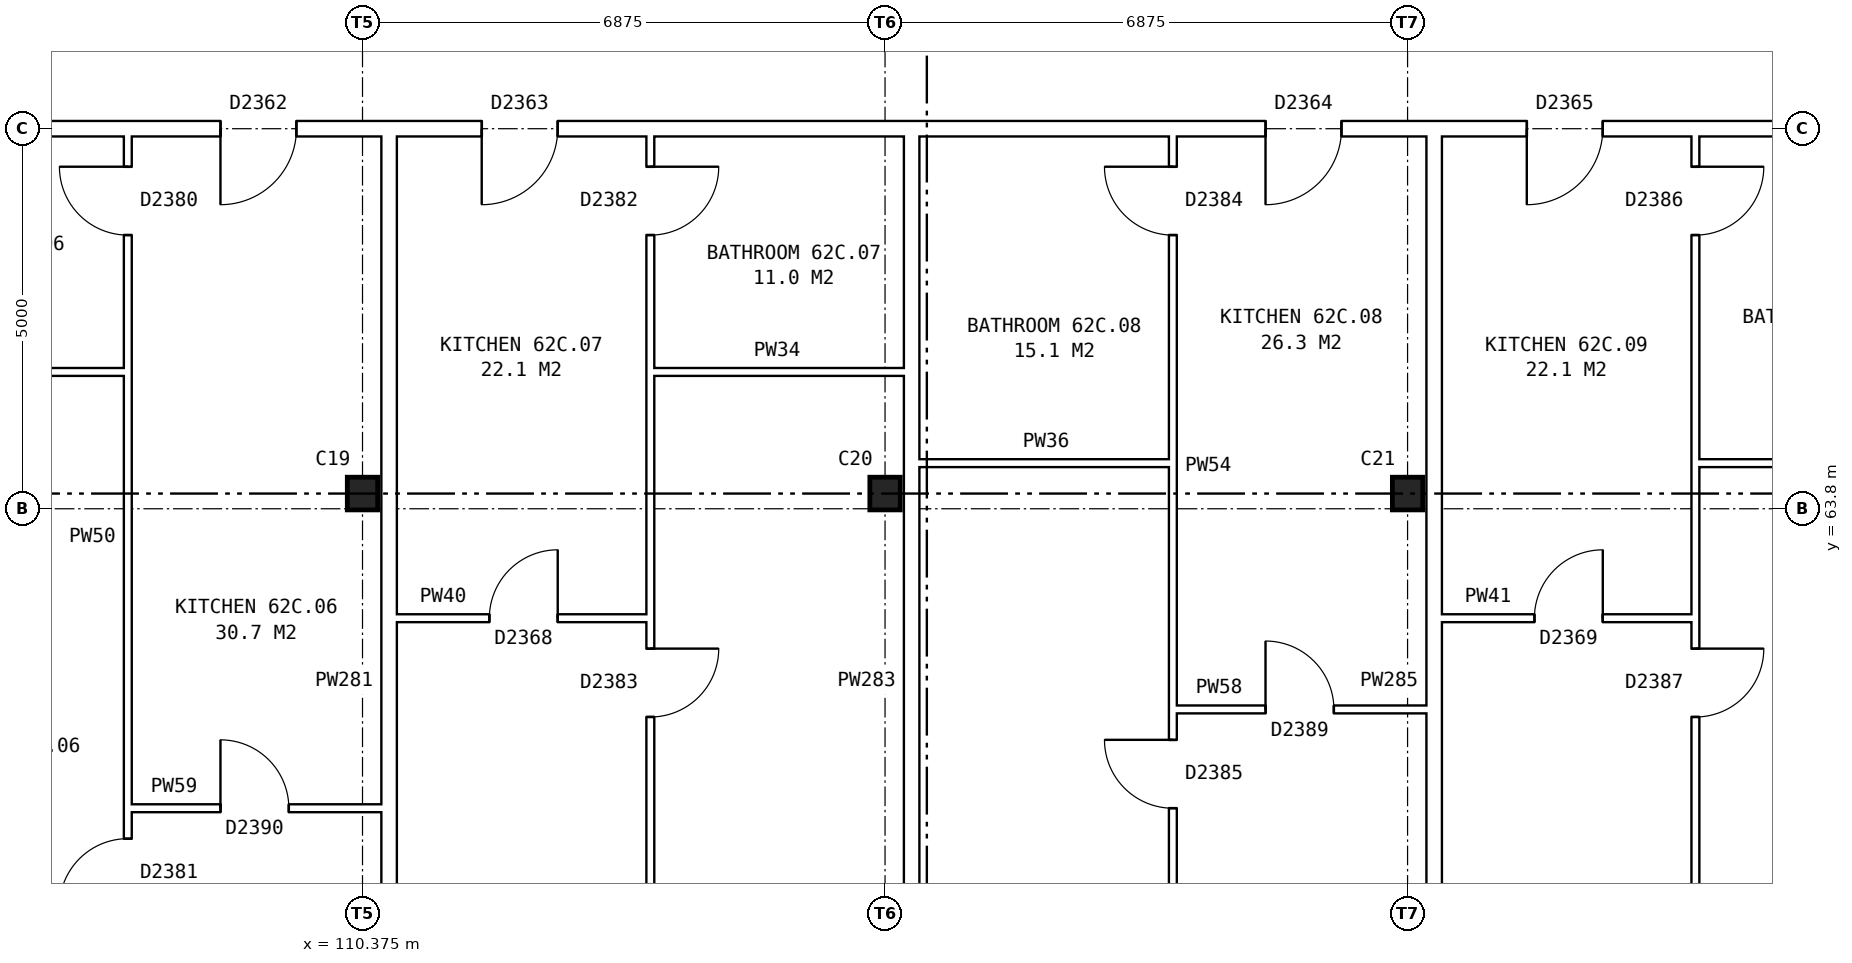
"""IFC4 building model, lengths in metres.
Left out: names, types, materials, properties, quantities, classifications, styles, units other than length and angle.
Written with IfcOpenShell. Run it as: python <this file> out.ifc"""

import sys

from ifc_helpers import new_model, si_unit, direction, frame, frame_2d, origin, origin_2d, place, context, subcontext, project, spatial, rectangle, i_section, extrude, element, fill, save


model = new_model("IFC4")
c1 = context("Model", 3, precision=1e-05, world=origin(), true_north=direction((0.0, 1.0)))
c2 = subcontext(c1, "Body", "Model", "MODEL_VIEW")
j1 = project(units=[si_unit("LENGTHUNIT", "METRE"), si_unit("PLANEANGLEUNIT", "RADIAN")], contexts=[c1])
p1 = place(None, origin())
s1 = spatial("IfcSite", under=j1, at=p1, CompositionType="ELEMENT")
p2 = place(p1, origin())
s2 = spatial("IfcBuilding", under=s1, at=p2, CompositionType="ELEMENT")
p3 = place(p2, frame((0.0, 0.0, 221.4)))
s3 = spatial("IfcBuildingStorey", under=s2, at=p3, CompositionType="ELEMENT", Elevation=221.4)
for number, where, z_axis, x_axis in (
    (1, (110.375, 64.0, 0.0), (0.0, 0.0, 1.0), (1.0, 0.0, 0.0)),
    (2, (117.25, 64.0, 0.0), (0.0, 0.0, 1.0), (1.0, 0.0, 0.0)),
    (3, (124.125, 64.0, 0.0), (0.0, 0.0, 1.0), (1.0, 0.0, 0.0)),
):
    element("IfcColumn", number, at=place(p3, frame(where, z_axis=z_axis, x_axis=x_axis)), inside=s3, PredefinedType="COLUMN", context=c2, shape_type="SweptSolid", body=[
        extrude(i_section(OverallWidth=0.4, OverallDepth=0.43, WebThickness=0.04, FlangeThickness=0.04, at=origin_2d()), origin(), (0.0, 0.0, 1.0), 2.85),
    ])
p4 = place(p3, frame((107.287, 59.86, 0.0), z_axis=(0.0, 0.0, 1.0), x_axis=(1.0, 0.0, 0.0)))
e4 = element("IfcWall", 4, at=p4, inside=s3, PredefinedType="PARTITIONING", context=c2, shape_type="SweptSolid", body=[
    extrude(rectangle(XDim=3.338, YDim=0.1, at=frame_2d((1.669, 0.0))), origin(), (0.0, 0.0, 1.0), 2.85),
])
p5 = place(p4, frame((1.219, 0.0, 0.0)))
e5 = element("IfcOpeningElement", 5, at=p5, cuts=e4, PredefinedType="OPENING", context=c2, shape_type="SweptSolid", body=[
    extrude(rectangle(XDim=0.9, YDim=2.1, at=frame_2d((0.45, 1.05))), frame((0.0, 0.06, 0.0), z_axis=(0.0, -1.0, 0.0), x_axis=(1.0, 0.0, 0.0)), (0.0, 0.0, 1.0), 0.12),
])
p6 = place(p3, frame((121.037, 61.16, 0.0), z_axis=(0.0, 0.0, 1.0), x_axis=(1.0, 0.0, 0.0)))
e6 = element("IfcWall", 6, at=p6, inside=s3, PredefinedType="PARTITIONING", context=c2, shape_type="SweptSolid", body=[
    extrude(rectangle(XDim=3.338, YDim=0.1, at=frame_2d((1.669, 0.0))), origin(), (0.0, 0.0, 1.0), 2.85),
])
p7 = place(p6, frame((1.219, 0.0, 0.0)))
e7 = element("IfcOpeningElement", 7, at=p7, cuts=e6, PredefinedType="OPENING", context=c2, shape_type="SweptSolid", body=[
    extrude(rectangle(XDim=0.9, YDim=2.1, at=frame_2d((0.45, 1.05))), frame((0.0, 0.06, 0.0), z_axis=(0.0, -1.0, 0.0), x_axis=(1.0, 0.0, 0.0)), (0.0, 0.0, 1.0), 0.12),
])
p8 = place(p3, frame((110.825, 62.36, 0.0), z_axis=(0.0, 0.0, 1.0), x_axis=(1.0, 0.0, 0.0)))
e8 = element("IfcWall", 8, at=p8, inside=s3, PredefinedType="PARTITIONING", context=c2, shape_type="SweptSolid", body=[
    extrude(rectangle(XDim=3.337, YDim=0.1, at=frame_2d((1.668, 0.0))), origin(), (0.0, 0.0, 1.0), 2.85),
])
p9 = place(p8, frame((1.219, 0.0, 0.0)))
e9 = element("IfcOpeningElement", 9, at=p9, cuts=e8, PredefinedType="OPENING", context=c2, shape_type="SweptSolid", body=[
    extrude(rectangle(XDim=0.9, YDim=2.1, at=frame_2d((0.45, 1.05))), frame((0.0, 0.06, 0.0), z_axis=(0.0, -1.0, 0.0), x_axis=(1.0, 0.0, 0.0)), (0.0, 0.0, 1.0), 0.12),
])
p10 = place(p3, frame((124.575, 62.36, 0.0), z_axis=(0.0, 0.0, 1.0), x_axis=(1.0, 0.0, 0.0)))
e10 = element("IfcWall", 10, at=p10, inside=s3, PredefinedType="PARTITIONING", context=c2, shape_type="SweptSolid", body=[
    extrude(rectangle(XDim=3.337, YDim=0.1, at=frame_2d((1.668, 0.0))), origin(), (0.0, 0.0, 1.0), 2.85),
])
p11 = place(p10, frame((1.219, 0.0, 0.0)))
e11 = element("IfcOpeningElement", 11, at=p11, cuts=e10, PredefinedType="OPENING", context=c2, shape_type="SweptSolid", body=[
    extrude(rectangle(XDim=0.9, YDim=2.1, at=frame_2d((0.45, 1.05))), frame((0.0, 0.06, 0.0), z_axis=(0.0, -1.0, 0.0), x_axis=(1.0, 0.0, 0.0)), (0.0, 0.0, 1.0), 0.12),
])
p12 = place(p3, frame((117.7, 64.4, 0.0), z_axis=(0.0, 0.0, 1.0), x_axis=(1.0, 0.0, 0.0)))
e12 = element("IfcWall", 12, at=p12, inside=s3, PredefinedType="PARTITIONING", context=c2, shape_type="SweptSolid", body=[
    extrude(rectangle(XDim=3.337, YDim=0.1, at=frame_2d((1.668, 0.0))), origin(), (0.0, 0.0, 1.0), 2.85),
])
p13 = place(p3, frame((127.912, 64.4, 0.0), z_axis=(0.0, 0.0, 1.0), x_axis=(1.0, 0.0, 0.0)))
e13 = element("IfcWall", 13, at=p13, inside=s3, PredefinedType="PARTITIONING", context=c2, shape_type="SweptSolid", body=[
    extrude(rectangle(XDim=3.448, YDim=0.1, at=frame_2d((1.724, 0.0))), origin(), (0.0, 0.0, 1.0), 2.85),
])
p14 = place(p3, frame((100.412, 65.6, 0.0), z_axis=(0.0, 0.0, 1.0), x_axis=(1.0, 0.0, 0.0)))
e14 = element("IfcWall", 14, at=p14, inside=s3, PredefinedType="PARTITIONING", context=c2, shape_type="SweptSolid", body=[
    extrude(rectangle(XDim=6.875, YDim=0.1, at=frame_2d((3.438, 0.0))), origin(), (0.0, 0.0, 1.0), 2.85),
])
p15 = place(p3, frame((114.162, 65.6, 0.0), z_axis=(0.0, 0.0, 1.0), x_axis=(1.0, 0.0, 0.0)))
e15 = element("IfcWall", 15, at=p15, inside=s3, PredefinedType="PARTITIONING", context=c2, shape_type="SweptSolid", body=[
    extrude(rectangle(XDim=3.338, YDim=0.1, at=frame_2d((1.669, 0.0))), origin(), (0.0, 0.0, 1.0), 2.85),
])
p16 = place(p3, frame((75.64, 68.8, 0.0), z_axis=(0.0, 0.0, 1.0), x_axis=(1.0, 0.0, 0.0)))
e16 = element("IfcWall", 16, at=p16, inside=s3, PredefinedType="PARTITIONING", context=c2, shape_type="SweptSolid", body=[
    extrude(rectangle(XDim=55.72, YDim=0.2, at=frame_2d((27.86, 0.0))), origin(), (0.0, 0.0, 1.0), 2.85),
])
p17 = place(p16, frame((1.399, 0.0, 0.0)))
e17 = element("IfcOpeningElement", 17, at=p17, cuts=e16, PredefinedType="OPENING", context=c2, shape_type="SweptSolid", body=[
    extrude(rectangle(XDim=1.0, YDim=2.1, at=frame_2d((0.5, 1.05))), frame((0.0, 0.11, 0.0), z_axis=(0.0, -1.0, 0.0), x_axis=(1.0, 0.0, 0.0)), (0.0, 0.0, 1.0), 0.22),
])
p18 = place(p16, frame((12.241, 0.0, 0.0)))
e18 = element("IfcOpeningElement", 18, at=p18, cuts=e16, PredefinedType="OPENING", context=c2, shape_type="SweptSolid", body=[
    extrude(rectangle(XDim=1.0, YDim=2.1, at=frame_2d((0.5, 1.05))), frame((0.0, 0.11, 0.0), z_axis=(0.0, -1.0, 0.0), x_axis=(1.0, 0.0, 0.0)), (0.0, 0.0, 1.0), 0.22),
])
p19 = place(p16, frame((22.553, 0.0, 0.0)))
e19 = element("IfcOpeningElement", 19, at=p19, cuts=e16, PredefinedType="OPENING", context=c2, shape_type="SweptSolid", body=[
    extrude(rectangle(XDim=1.0, YDim=2.1, at=frame_2d((0.5, 1.05))), frame((0.0, 0.11, 0.0), z_axis=(0.0, -1.0, 0.0), x_axis=(1.0, 0.0, 0.0)), (0.0, 0.0, 1.0), 0.22),
])
p20 = place(p16, frame((32.866, 0.0, 0.0)))
e20 = element("IfcOpeningElement", 20, at=p20, cuts=e16, PredefinedType="OPENING", context=c2, shape_type="SweptSolid", body=[
    extrude(rectangle(XDim=1.0, YDim=2.1, at=frame_2d((0.5, 1.05))), frame((0.0, 0.11, 0.0), z_axis=(0.0, -1.0, 0.0), x_axis=(1.0, 0.0, 0.0)), (0.0, 0.0, 1.0), 0.22),
])
p21 = place(p16, frame((36.303, 0.0, 0.0)))
e21 = element("IfcOpeningElement", 21, at=p21, cuts=e16, PredefinedType="OPENING", context=c2, shape_type="SweptSolid", body=[
    extrude(rectangle(XDim=1.0, YDim=2.1, at=frame_2d((0.5, 1.05))), frame((0.0, 0.11, 0.0), z_axis=(0.0, -1.0, 0.0), x_axis=(1.0, 0.0, 0.0)), (0.0, 0.0, 1.0), 0.22),
])
p22 = place(p16, frame((46.616, 0.0, 0.0)))
e22 = element("IfcOpeningElement", 22, at=p22, cuts=e16, PredefinedType="OPENING", context=c2, shape_type="SweptSolid", body=[
    extrude(rectangle(XDim=1.0, YDim=2.1, at=frame_2d((0.5, 1.05))), frame((0.0, 0.11, 0.0), z_axis=(0.0, -1.0, 0.0), x_axis=(1.0, 0.0, 0.0)), (0.0, 0.0, 1.0), 0.22),
])
p23 = place(p16, frame((50.053, 0.0, 0.0)))
e23 = element("IfcOpeningElement", 23, at=p23, cuts=e16, PredefinedType="OPENING", context=c2, shape_type="SweptSolid", body=[
    extrude(rectangle(XDim=1.0, YDim=2.1, at=frame_2d((0.5, 1.05))), frame((0.0, 0.11, 0.0), z_axis=(0.0, -1.0, 0.0), x_axis=(1.0, 0.0, 0.0)), (0.0, 0.0, 1.0), 0.22),
])
p24 = place(p3, frame((107.287, 54.36, 0.0), z_axis=(0.0, 0.0, 1.0), x_axis=(0.0, 1.0, 0.0)))
e24 = element("IfcWall", 24, at=p24, inside=s3, PredefinedType="PARTITIONING", context=c2, shape_type="SweptSolid", body=[
    extrude(rectangle(XDim=14.34, YDim=0.1, at=frame_2d((7.17, 0.0))), origin(), (0.0, 0.0, 1.0), 2.85),
])
p25 = place(p24, frame((4.2, 0.0, 0.0)))
e25 = element("IfcOpeningElement", 25, at=p25, cuts=e24, PredefinedType="OPENING", context=c2, shape_type="SweptSolid", body=[
    extrude(rectangle(XDim=0.9, YDim=2.1, at=frame_2d((0.45, 1.05))), frame((0.0, 0.06, 0.0), z_axis=(0.0, -1.0, 0.0), x_axis=(1.0, 0.0, 0.0)), (0.0, 0.0, 1.0), 0.12),
])
p26 = place(p24, frame((13.04, 0.0, 0.0)))
e26 = element("IfcOpeningElement", 26, at=p26, cuts=e24, PredefinedType="OPENING", context=c2, shape_type="SweptSolid", body=[
    extrude(rectangle(XDim=0.9, YDim=2.1, at=frame_2d((0.45, 1.05))), frame((0.0, 0.06, 0.0), z_axis=(0.0, -1.0, 0.0), x_axis=(1.0, 0.0, 0.0)), (0.0, 0.0, 1.0), 0.12),
])
p27 = place(p3, frame((110.725, 54.36, 0.0), z_axis=(0.0, 0.0, 1.0), x_axis=(0.0, 1.0, 0.0)))
e27 = element("IfcWall", 27, at=p27, inside=s3, PredefinedType="PARTITIONING", context=c2, shape_type="SweptSolid", body=[
    extrude(rectangle(XDim=14.34, YDim=0.2, at=frame_2d((7.17, 0.0))), origin(), (0.0, 0.0, 1.0), 2.85),
])
p28 = place(p3, frame((114.162, 54.36, 0.0), z_axis=(0.0, 0.0, 1.0), x_axis=(0.0, 1.0, 0.0)))
e28 = element("IfcWall", 28, at=p28, inside=s3, PredefinedType="PARTITIONING", context=c2, shape_type="SweptSolid", body=[
    extrude(rectangle(XDim=14.34, YDim=0.1, at=frame_2d((7.17, 0.0))), origin(), (0.0, 0.0, 1.0), 2.85),
])
p29 = place(p28, frame((6.7, 0.0, 0.0)))
e29 = element("IfcOpeningElement", 29, at=p29, cuts=e28, PredefinedType="OPENING", context=c2, shape_type="SweptSolid", body=[
    extrude(rectangle(XDim=0.9, YDim=2.1, at=frame_2d((0.45, 1.05))), frame((0.0, 0.06, 0.0), z_axis=(0.0, -1.0, 0.0), x_axis=(1.0, 0.0, 0.0)), (0.0, 0.0, 1.0), 0.12),
])
p30 = place(p28, frame((13.04, 0.0, 0.0)))
e30 = element("IfcOpeningElement", 30, at=p30, cuts=e28, PredefinedType="OPENING", context=c2, shape_type="SweptSolid", body=[
    extrude(rectangle(XDim=0.9, YDim=2.1, at=frame_2d((0.45, 1.05))), frame((0.0, 0.06, 0.0), z_axis=(0.0, -1.0, 0.0), x_axis=(1.0, 0.0, 0.0)), (0.0, 0.0, 1.0), 0.12),
])
p31 = place(p3, frame((117.6, 54.36, 0.0), z_axis=(0.0, 0.0, 1.0), x_axis=(0.0, 1.0, 0.0)))
e31 = element("IfcWall", 31, at=p31, inside=s3, PredefinedType="PARTITIONING", context=c2, shape_type="SweptSolid", body=[
    extrude(rectangle(XDim=14.34, YDim=0.2, at=frame_2d((7.17, 0.0))), origin(), (0.0, 0.0, 1.0), 2.85),
])
p32 = place(p3, frame((121.037, 54.36, 0.0), z_axis=(0.0, 0.0, 1.0), x_axis=(0.0, 1.0, 0.0)))
e32 = element("IfcWall", 32, at=p32, inside=s3, PredefinedType="PARTITIONING", context=c2, shape_type="SweptSolid", body=[
    extrude(rectangle(XDim=14.34, YDim=0.1, at=frame_2d((7.17, 0.0))), origin(), (0.0, 0.0, 1.0), 2.85),
])
p33 = place(p32, frame((5.5, 0.0, 0.0)))
e33 = element("IfcOpeningElement", 33, at=p33, cuts=e32, PredefinedType="OPENING", context=c2, shape_type="SweptSolid", body=[
    extrude(rectangle(XDim=0.9, YDim=2.1, at=frame_2d((0.45, 1.05))), frame((0.0, 0.06, 0.0), z_axis=(0.0, -1.0, 0.0), x_axis=(1.0, 0.0, 0.0)), (0.0, 0.0, 1.0), 0.12),
])
p34 = place(p32, frame((13.04, 0.0, 0.0)))
e34 = element("IfcOpeningElement", 34, at=p34, cuts=e32, PredefinedType="OPENING", context=c2, shape_type="SweptSolid", body=[
    extrude(rectangle(XDim=0.9, YDim=2.1, at=frame_2d((0.45, 1.05))), frame((0.0, 0.06, 0.0), z_axis=(0.0, -1.0, 0.0), x_axis=(1.0, 0.0, 0.0)), (0.0, 0.0, 1.0), 0.12),
])
p35 = place(p3, frame((124.475, 54.36, 0.0), z_axis=(0.0, 0.0, 1.0), x_axis=(0.0, 1.0, 0.0)))
e35 = element("IfcWall", 35, at=p35, inside=s3, PredefinedType="PARTITIONING", context=c2, shape_type="SweptSolid", body=[
    extrude(rectangle(XDim=14.34, YDim=0.2, at=frame_2d((7.17, 0.0))), origin(), (0.0, 0.0, 1.0), 2.85),
])
p36 = place(p3, frame((127.912, 54.36, 0.0), z_axis=(0.0, 0.0, 1.0), x_axis=(0.0, 1.0, 0.0)))
e36 = element("IfcWall", 36, at=p36, inside=s3, PredefinedType="PARTITIONING", context=c2, shape_type="SweptSolid", body=[
    extrude(rectangle(XDim=14.34, YDim=0.1, at=frame_2d((7.17, 0.0))), origin(), (0.0, 0.0, 1.0), 2.85),
])
p37 = place(p36, frame((6.7, 0.0, 0.0)))
e37 = element("IfcOpeningElement", 37, at=p37, cuts=e36, PredefinedType="OPENING", context=c2, shape_type="SweptSolid", body=[
    extrude(rectangle(XDim=0.9, YDim=2.1, at=frame_2d((0.45, 1.05))), frame((0.0, 0.06, 0.0), z_axis=(0.0, -1.0, 0.0), x_axis=(1.0, 0.0, 0.0)), (0.0, 0.0, 1.0), 0.12),
])
p38 = place(p36, frame((13.04, 0.0, 0.0)))
e38 = element("IfcOpeningElement", 38, at=p38, cuts=e36, PredefinedType="OPENING", context=c2, shape_type="SweptSolid", body=[
    extrude(rectangle(XDim=0.9, YDim=2.1, at=frame_2d((0.45, 1.05))), frame((0.0, 0.06, 0.0), z_axis=(0.0, -1.0, 0.0), x_axis=(1.0, 0.0, 0.0)), (0.0, 0.0, 1.0), 0.12),
])
p39 = place(p25, origin())
e39 = element("IfcDoor", 39, at=p39, inside=s3, OperationType="SINGLE_SWING_LEFT", PredefinedType="DOOR", context=c2, shape_type="SweptSolid", body=[
    extrude(rectangle(XDim=0.9, YDim=2.1, at=frame_2d((0.45, 1.05))), frame((0.0, 0.025, 0.0), z_axis=(0.0, -1.0, 0.0), x_axis=(1.0, 0.0, 0.0)), (0.0, 0.0, 1.0), 0.05),
])
fill(e25, e39)
p40 = place(p20, frame((1.0, 0.0, 0.0), z_axis=(0.0, 0.0, 1.0), x_axis=(-1.0, 0.0, 0.0)))
e40 = element("IfcDoor", 40, at=p40, inside=s3, OperationType="SINGLE_SWING_RIGHT", PredefinedType="DOOR", context=c2, shape_type="SweptSolid", body=[
    extrude(rectangle(XDim=1.0, YDim=2.1, at=frame_2d((0.5, 1.05))), frame((0.0, 0.025, 0.0), z_axis=(0.0, -1.0, 0.0), x_axis=(1.0, 0.0, 0.0)), (0.0, 0.0, 1.0), 0.05),
])
fill(e20, e40)
p41 = place(p5, origin())
e41 = element("IfcDoor", 41, at=p41, inside=s3, OperationType="SINGLE_SWING_LEFT", PredefinedType="DOOR", context=c2, shape_type="SweptSolid", body=[
    extrude(rectangle(XDim=0.9, YDim=2.1, at=frame_2d((0.45, 1.05))), frame((0.0, 0.025, 0.0), z_axis=(0.0, -1.0, 0.0), x_axis=(1.0, 0.0, 0.0)), (0.0, 0.0, 1.0), 0.05),
])
fill(e5, e41)
p42 = place(p26, origin())
e42 = element("IfcDoor", 42, at=p42, inside=s3, OperationType="SINGLE_SWING_RIGHT", PredefinedType="DOOR", context=c2, shape_type="SweptSolid", body=[
    extrude(rectangle(XDim=0.9, YDim=2.1, at=frame_2d((0.45, 1.05))), frame((0.0, 0.025, 0.0), z_axis=(0.0, -1.0, 0.0), x_axis=(1.0, 0.0, 0.0)), (0.0, 0.0, 1.0), 0.05),
])
fill(e26, e42)
p43 = place(p29, frame((0.9, 0.0, 0.0), z_axis=(0.0, 0.0, 1.0), x_axis=(-1.0, 0.0, 0.0)))
e43 = element("IfcDoor", 43, at=p43, inside=s3, OperationType="SINGLE_SWING_LEFT", PredefinedType="DOOR", context=c2, shape_type="SweptSolid", body=[
    extrude(rectangle(XDim=0.9, YDim=2.1, at=frame_2d((0.45, 1.05))), frame((0.0, 0.025, 0.0), z_axis=(0.0, -1.0, 0.0), x_axis=(1.0, 0.0, 0.0)), (0.0, 0.0, 1.0), 0.05),
])
fill(e29, e43)
p44 = place(p21, frame((1.0, 0.0, 0.0), z_axis=(0.0, 0.0, 1.0), x_axis=(-1.0, 0.0, 0.0)))
e44 = element("IfcDoor", 44, at=p44, inside=s3, OperationType="SINGLE_SWING_RIGHT", PredefinedType="DOOR", context=c2, shape_type="SweptSolid", body=[
    extrude(rectangle(XDim=1.0, YDim=2.1, at=frame_2d((0.5, 1.05))), frame((0.0, 0.025, 0.0), z_axis=(0.0, -1.0, 0.0), x_axis=(1.0, 0.0, 0.0)), (0.0, 0.0, 1.0), 0.05),
])
fill(e21, e44)
p45 = place(p9, origin())
e45 = element("IfcDoor", 45, at=p45, inside=s3, OperationType="SINGLE_SWING_RIGHT", PredefinedType="DOOR", context=c2, shape_type="SweptSolid", body=[
    extrude(rectangle(XDim=0.9, YDim=2.1, at=frame_2d((0.45, 1.05))), frame((0.0, 0.025, 0.0), z_axis=(0.0, -1.0, 0.0), x_axis=(1.0, 0.0, 0.0)), (0.0, 0.0, 1.0), 0.05),
])
fill(e9, e45)
p46 = place(p30, frame((0.9, 0.0, 0.0), z_axis=(0.0, 0.0, 1.0), x_axis=(-1.0, 0.0, 0.0)))
e46 = element("IfcDoor", 46, at=p46, inside=s3, OperationType="SINGLE_SWING_LEFT", PredefinedType="DOOR", context=c2, shape_type="SweptSolid", body=[
    extrude(rectangle(XDim=0.9, YDim=2.1, at=frame_2d((0.45, 1.05))), frame((0.0, 0.025, 0.0), z_axis=(0.0, -1.0, 0.0), x_axis=(1.0, 0.0, 0.0)), (0.0, 0.0, 1.0), 0.05),
])
fill(e30, e46)
p47 = place(p33, origin())
e47 = element("IfcDoor", 47, at=p47, inside=s3, OperationType="SINGLE_SWING_RIGHT", PredefinedType="DOOR", context=c2, shape_type="SweptSolid", body=[
    extrude(rectangle(XDim=0.9, YDim=2.1, at=frame_2d((0.45, 1.05))), frame((0.0, 0.025, 0.0), z_axis=(0.0, -1.0, 0.0), x_axis=(1.0, 0.0, 0.0)), (0.0, 0.0, 1.0), 0.05),
])
fill(e33, e47)
p48 = place(p22, frame((1.0, 0.0, 0.0), z_axis=(0.0, 0.0, 1.0), x_axis=(-1.0, 0.0, 0.0)))
e48 = element("IfcDoor", 48, at=p48, inside=s3, OperationType="SINGLE_SWING_RIGHT", PredefinedType="DOOR", context=c2, shape_type="SweptSolid", body=[
    extrude(rectangle(XDim=1.0, YDim=2.1, at=frame_2d((0.5, 1.05))), frame((0.0, 0.025, 0.0), z_axis=(0.0, -1.0, 0.0), x_axis=(1.0, 0.0, 0.0)), (0.0, 0.0, 1.0), 0.05),
])
fill(e22, e48)
p49 = place(p7, origin())
e49 = element("IfcDoor", 49, at=p49, inside=s3, OperationType="SINGLE_SWING_LEFT", PredefinedType="DOOR", context=c2, shape_type="SweptSolid", body=[
    extrude(rectangle(XDim=0.9, YDim=2.1, at=frame_2d((0.45, 1.05))), frame((0.0, 0.025, 0.0), z_axis=(0.0, -1.0, 0.0), x_axis=(1.0, 0.0, 0.0)), (0.0, 0.0, 1.0), 0.05),
])
fill(e7, e49)
p50 = place(p34, origin())
e50 = element("IfcDoor", 50, at=p50, inside=s3, OperationType="SINGLE_SWING_RIGHT", PredefinedType="DOOR", context=c2, shape_type="SweptSolid", body=[
    extrude(rectangle(XDim=0.9, YDim=2.1, at=frame_2d((0.45, 1.05))), frame((0.0, 0.025, 0.0), z_axis=(0.0, -1.0, 0.0), x_axis=(1.0, 0.0, 0.0)), (0.0, 0.0, 1.0), 0.05),
])
fill(e34, e50)
p51 = place(p37, frame((0.9, 0.0, 0.0), z_axis=(0.0, 0.0, 1.0), x_axis=(-1.0, 0.0, 0.0)))
e51 = element("IfcDoor", 51, at=p51, inside=s3, OperationType="SINGLE_SWING_LEFT", PredefinedType="DOOR", context=c2, shape_type="SweptSolid", body=[
    extrude(rectangle(XDim=0.9, YDim=2.1, at=frame_2d((0.45, 1.05))), frame((0.0, 0.025, 0.0), z_axis=(0.0, -1.0, 0.0), x_axis=(1.0, 0.0, 0.0)), (0.0, 0.0, 1.0), 0.05),
])
fill(e37, e51)
p52 = place(p23, frame((1.0, 0.0, 0.0), z_axis=(0.0, 0.0, 1.0), x_axis=(-1.0, 0.0, 0.0)))
e52 = element("IfcDoor", 52, at=p52, inside=s3, OperationType="SINGLE_SWING_RIGHT", PredefinedType="DOOR", context=c2, shape_type="SweptSolid", body=[
    extrude(rectangle(XDim=1.0, YDim=2.1, at=frame_2d((0.5, 1.05))), frame((0.0, 0.025, 0.0), z_axis=(0.0, -1.0, 0.0), x_axis=(1.0, 0.0, 0.0)), (0.0, 0.0, 1.0), 0.05),
])
fill(e23, e52)
p53 = place(p11, origin())
e53 = element("IfcDoor", 53, at=p53, inside=s3, OperationType="SINGLE_SWING_RIGHT", PredefinedType="DOOR", context=c2, shape_type="SweptSolid", body=[
    extrude(rectangle(XDim=0.9, YDim=2.1, at=frame_2d((0.45, 1.05))), frame((0.0, 0.025, 0.0), z_axis=(0.0, -1.0, 0.0), x_axis=(1.0, 0.0, 0.0)), (0.0, 0.0, 1.0), 0.05),
])
fill(e11, e53)
p54 = place(p38, frame((0.9, 0.0, 0.0), z_axis=(0.0, 0.0, 1.0), x_axis=(-1.0, 0.0, 0.0)))
e54 = element("IfcDoor", 54, at=p54, inside=s3, OperationType="SINGLE_SWING_LEFT", PredefinedType="DOOR", context=c2, shape_type="SweptSolid", body=[
    extrude(rectangle(XDim=0.9, YDim=2.1, at=frame_2d((0.45, 1.05))), frame((0.0, 0.025, 0.0), z_axis=(0.0, -1.0, 0.0), x_axis=(1.0, 0.0, 0.0)), (0.0, 0.0, 1.0), 0.05),
])
fill(e38, e54)
save(model, sys.argv[1])
